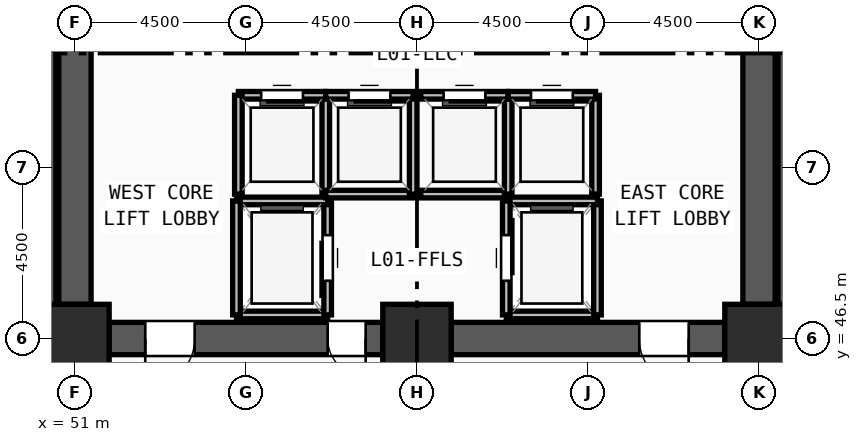
"""IFC4 building model, lengths in metres.
Left out: names, types, materials, properties, quantities, classifications, styles, units other than length and angle.
Written with IfcOpenShell. Run it as: python <this file> out.ifc"""

import sys

from ifc_helpers import new_model, si_unit, direction, frame, frame_2d, origin, origin_2d, place, context, subcontext, project, spatial, rectangle, extrude, source, transform, mapped, element, fill, save


model = new_model("IFC4")
c1 = context("Model", 3, precision=1e-05, world=origin(), true_north=direction((0.0, 1.0)))
c2 = subcontext(c1, "Body", "Model", "MODEL_VIEW")
j1 = project(units=[si_unit("LENGTHUNIT", "METRE"), si_unit("PLANEANGLEUNIT", "RADIAN")], contexts=[c1])
p1 = place(None, origin())
s1 = spatial("IfcSite", under=j1, at=p1, CompositionType="ELEMENT")
p2 = place(p1, origin())
s2 = spatial("IfcBuilding", under=s1, at=p2, CompositionType="ELEMENT")
p3 = place(p2, origin())
s3 = spatial("IfcBuildingStorey", under=s2, at=p3, CompositionType="ELEMENT", Elevation=0.0)
m1 = source(origin(), c2, "Body", "SweptSolid", [
    extrude(rectangle(XDim=1.8, YDim=1.8, at=origin_2d()), origin(), (0.0, 0.0, 1.0), 5.4),
])
for number, where, z_axis, x_axis in (
    (1, (51.0, 46.5, 0.0), (0.0, 0.0, 1.0), (1.0, 0.0, 0.0)),
    (2, (60.0, 46.5, 0.0), (0.0, 0.0, 1.0), (1.0, 0.0, 0.0)),
    (3, (69.0, 46.5, 0.0), (0.0, 0.0, 1.0), (1.0, 0.0, 0.0)),
):
    element("IfcColumn", number, at=place(p3, frame(where, z_axis=z_axis, x_axis=x_axis)), inside=s3, PredefinedType="COLUMN", context=c2, shape_type="MappedRepresentation", body=[
        mapped(m1, transform((0.0, 0.0, 0.0), x_axis=(1.0, 0.0, 0.0), y_axis=(0.0, 1.0, 0.0), z_axis=(0.0, 0.0, 1.0), scale=1.0)),
    ])
p4 = place(p3, frame((69.0, 60.6, 0.0), z_axis=(0.0, 0.0, 1.0), x_axis=(0.0, -1.0, 0.0)))
e4 = element("IfcWall", 4, at=p4, inside=s3, PredefinedType="SHEAR", context=c2, shape_type="SweptSolid", body=[
    extrude(rectangle(XDim=13.2, YDim=0.85, at=frame_2d((6.6, 0.0))), origin(), (0.0, 0.0, 1.0), 5.15),
])
m2 = source(origin(), c2, "Body", "SweptSolid", [
    extrude(rectangle(XDim=1.2, YDim=2.2, at=frame_2d((0.6, 1.1))), frame((0.0, 0.435, 0.0), z_axis=(0.0, -1.0, 0.0), x_axis=(1.0, 0.0, 0.0)), (0.0, 0.0, 1.0), 0.87),
])
p5 = place(p4, frame((1.05, 0.0, 0.0)))
e5 = element("IfcOpeningElement", 5, at=p5, cuts=e4, PredefinedType="OPENING", context=c2, shape_type="MappedRepresentation", body=[
    mapped(m2, transform((0.0, 0.0, 0.0), x_axis=(1.0, 0.0, 0.0), y_axis=(0.0, 1.0, 0.0), z_axis=(0.0, 0.0, 1.0), scale=1.0)),
])
p6 = place(p3, frame((68.1, 46.5, 0.0), z_axis=(0.0, 0.0, 1.0), x_axis=(-1.0, 0.0, 0.0)))
e6 = element("IfcWall", 6, at=p6, inside=s3, PredefinedType="SHEAR", context=c2, shape_type="SweptSolid", body=[
    extrude(rectangle(XDim=7.2, YDim=0.85, at=frame_2d((3.6, 0.0))), origin(), (0.0, 0.0, 1.0), 5.15),
])
m3 = source(origin(), c2, "Body", "SweptSolid", [
    extrude(rectangle(XDim=1.3, YDim=2.2, at=frame_2d((0.65, 1.1))), frame((0.0, 0.435, 0.0), z_axis=(0.0, -1.0, 0.0), x_axis=(1.0, 0.0, 0.0)), (0.0, 0.0, 1.0), 0.87),
])
p7 = place(p6, frame((0.95, 0.0, 0.0)))
e7 = element("IfcOpeningElement", 7, at=p7, cuts=e6, PredefinedType="OPENING", context=c2, shape_type="MappedRepresentation", body=[
    mapped(m3, transform((0.0, 0.0, 0.0), x_axis=(1.0, 0.0, 0.0), y_axis=(0.0, 1.0, 0.0), z_axis=(0.0, 0.0, 1.0), scale=1.0)),
])
p8 = place(p3, frame((59.1, 46.5, 0.0), z_axis=(0.0, 0.0, 1.0), x_axis=(-1.0, 0.0, 0.0)))
e8 = element("IfcWall", 8, at=p8, inside=s3, PredefinedType="SHEAR", context=c2, shape_type="SweptSolid", body=[
    extrude(rectangle(XDim=7.2, YDim=0.85, at=frame_2d((3.6, 0.0))), origin(), (0.0, 0.0, 1.0), 5.15),
])
p9 = place(p8, frame((4.95, 0.0, 0.0)))
e9 = element("IfcOpeningElement", 9, at=p9, cuts=e8, PredefinedType="OPENING", context=c2, shape_type="MappedRepresentation", body=[
    mapped(m3, transform((0.0, 0.0, 0.0), x_axis=(1.0, 0.0, 0.0), y_axis=(0.0, 1.0, 0.0), z_axis=(0.0, 0.0, 1.0), scale=1.0)),
])
m4 = source(origin(), c2, "Body", "SweptSolid", [
    extrude(rectangle(XDim=1.0, YDim=2.2, at=frame_2d((0.5, 1.1))), frame((0.0, 0.435, 0.0), z_axis=(0.0, -1.0, 0.0), x_axis=(1.0, 0.0, 0.0)), (0.0, 0.0, 1.0), 0.87),
])
p10 = place(p8, frame((0.45, 0.0, 0.0)))
e10 = element("IfcOpeningElement", 10, at=p10, cuts=e8, PredefinedType="OPENING", context=c2, shape_type="MappedRepresentation", body=[
    mapped(m4, transform((0.0, 0.0, 0.0), x_axis=(1.0, 0.0, 0.0), y_axis=(0.0, 1.0, 0.0), z_axis=(0.0, 0.0, 1.0), scale=1.0)),
])
p11 = place(p3, frame((51.0, 47.4, 0.0), z_axis=(0.0, 0.0, 1.0), x_axis=(0.0, 1.0, 0.0)))
e11 = element("IfcWall", 11, at=p11, inside=s3, PredefinedType="SHEAR", context=c2, shape_type="SweptSolid", body=[
    extrude(rectangle(XDim=13.2, YDim=0.85, at=frame_2d((6.6, 0.0))), origin(), (0.0, 0.0, 1.0), 5.15),
])
m5 = source(origin(), c2, "Body", "SweptSolid", [
    extrude(rectangle(XDim=1.1, YDim=2.2, at=frame_2d((0.55, 1.1))), frame((0.0, 0.435, 0.0), z_axis=(0.0, -1.0, 0.0), x_axis=(1.0, 0.0, 0.0)), (0.0, 0.0, 1.0), 0.87),
])
p12 = place(p11, frame((11.5, 0.0, 0.0)))
e12 = element("IfcOpeningElement", 12, at=p12, cuts=e11, PredefinedType="OPENING", context=c2, shape_type="MappedRepresentation", body=[
    mapped(m5, transform((0.0, 0.0, 0.0), x_axis=(1.0, 0.0, 0.0), y_axis=(0.0, 1.0, 0.0), z_axis=(0.0, 0.0, 1.0), scale=1.0)),
])
for number, where, z_axis, x_axis in (
    (13, (50.38, 46.7, 0.0), (0.0, 0.0, 1.0), (0.0, 1.0, 0.0)),
    (14, (69.62, 54.52, 0.0), (0.0, 0.0, 1.0), (0.0, -1.0, 0.0)),
):
    element("IfcWall", number, at=place(p3, frame(where, z_axis=z_axis, x_axis=x_axis)), inside=s3, PredefinedType="SOLIDWALL", context=c2, shape_type="SweptSolid", body=[
        extrude(rectangle(XDim=7.82, YDim=0.24, at=frame_2d((3.91, 0.0))), origin(), (0.0, 0.0, 1.0), 5.15),
    ])
p13 = place(p3, frame((55.25, 47.12, 0.0), z_axis=(0.0, 0.0, 1.0), x_axis=(1.0, 0.0, 0.0)))
e15 = element("IfcWall", 15, at=p13, inside=s3, PredefinedType="SOLIDWALL", context=c2, shape_type="SweptSolid", body=[
    extrude(rectangle(XDim=2.4, YDim=0.2, at=frame_2d((1.2, 0.0))), origin(), (0.0, 0.0, 1.0), 5.15),
])
p14 = place(p3, frame((57.65, 47.12, 0.0), z_axis=(0.0, 0.0, 1.0), x_axis=(0.0, 1.0, 0.0)))
e16 = element("IfcWall", 16, at=p14, inside=s3, PredefinedType="SOLIDWALL", context=c2, shape_type="SweptSolid", body=[
    extrude(rectangle(XDim=3.0, YDim=0.2, at=frame_2d((1.5, 0.0))), origin(), (0.0, 0.0, 1.0), 5.15),
])
m6 = source(origin(), c2, "Body", "SweptSolid", [
    extrude(rectangle(XDim=1.2, YDim=2.3, at=frame_2d((0.6, 1.15))), frame((0.0, 0.11, 0.0), z_axis=(0.0, -1.0, 0.0), x_axis=(1.0, 0.0, 0.0)), (0.0, 0.0, 1.0), 0.22),
])
p15 = place(p14, frame((0.9, 0.0, 0.0)))
e17 = element("IfcOpeningElement", 17, at=p15, cuts=e16, PredefinedType="OPENING", context=c2, shape_type="MappedRepresentation", body=[
    mapped(m6, transform((0.0, 0.0, 0.0), x_axis=(1.0, 0.0, 0.0), y_axis=(0.0, 1.0, 0.0), z_axis=(0.0, 0.0, 1.0), scale=1.0)),
])
p16 = place(p3, frame((57.65, 50.12, 0.0), z_axis=(0.0, 0.0, 1.0), x_axis=(-1.0, 0.0, 0.0)))
e18 = element("IfcWall", 18, at=p16, inside=s3, PredefinedType="SOLIDWALL", context=c2, shape_type="SweptSolid", body=[
    extrude(rectangle(XDim=2.4, YDim=0.2, at=frame_2d((1.2, 0.0))), origin(), (0.0, 0.0, 1.0), 5.15),
])
p17 = place(p3, frame((55.25, 50.12, 0.0), z_axis=(0.0, 0.0, 1.0), x_axis=(0.0, -1.0, 0.0)))
e19 = element("IfcWall", 19, at=p17, inside=s3, PredefinedType="SOLIDWALL", context=c2, shape_type="SweptSolid", body=[
    extrude(rectangle(XDim=3.0, YDim=0.2, at=frame_2d((1.5, 0.0))), origin(), (0.0, 0.0, 1.0), 5.15),
])
p18 = place(p3, frame((62.35, 47.12, 0.0), z_axis=(0.0, 0.0, 1.0), x_axis=(1.0, 0.0, 0.0)))
e20 = element("IfcWall", 20, at=p18, inside=s3, PredefinedType="SOLIDWALL", context=c2, shape_type="SweptSolid", body=[
    extrude(rectangle(XDim=2.4, YDim=0.2, at=frame_2d((1.2, 0.0))), origin(), (0.0, 0.0, 1.0), 5.15),
])
p19 = place(p3, frame((64.75, 47.12, 0.0), z_axis=(0.0, 0.0, 1.0), x_axis=(0.0, 1.0, 0.0)))
e21 = element("IfcWall", 21, at=p19, inside=s3, PredefinedType="SOLIDWALL", context=c2, shape_type="SweptSolid", body=[
    extrude(rectangle(XDim=3.0, YDim=0.2, at=frame_2d((1.5, 0.0))), origin(), (0.0, 0.0, 1.0), 5.15),
])
p20 = place(p3, frame((64.75, 50.12, 0.0), z_axis=(0.0, 0.0, 1.0), x_axis=(-1.0, 0.0, 0.0)))
e22 = element("IfcWall", 22, at=p20, inside=s3, PredefinedType="SOLIDWALL", context=c2, shape_type="SweptSolid", body=[
    extrude(rectangle(XDim=2.4, YDim=0.2, at=frame_2d((1.2, 0.0))), origin(), (0.0, 0.0, 1.0), 5.15),
])
p21 = place(p3, frame((62.35, 50.12, 0.0), z_axis=(0.0, 0.0, 1.0), x_axis=(0.0, -1.0, 0.0)))
e23 = element("IfcWall", 23, at=p21, inside=s3, PredefinedType="SOLIDWALL", context=c2, shape_type="SweptSolid", body=[
    extrude(rectangle(XDim=3.0, YDim=0.2, at=frame_2d((1.5, 0.0))), origin(), (0.0, 0.0, 1.0), 5.15),
])
p22 = place(p21, frame((0.9, 0.0, 0.0)))
e24 = element("IfcOpeningElement", 24, at=p22, cuts=e23, PredefinedType="OPENING", context=c2, shape_type="MappedRepresentation", body=[
    mapped(m6, transform((0.0, 0.0, 0.0), x_axis=(1.0, 0.0, 0.0), y_axis=(0.0, 1.0, 0.0), z_axis=(0.0, 0.0, 1.0), scale=1.0)),
])
p23 = place(p3, frame((57.6, 50.3, 0.0), z_axis=(0.0, 0.0, 1.0), x_axis=(0.0, 1.0, 0.0)))
e25 = element("IfcWall", 25, at=p23, inside=s3, PredefinedType="SOLIDWALL", context=c2, shape_type="SweptSolid", body=[
    extrude(rectangle(XDim=2.6, YDim=0.2, at=frame_2d((1.3, 0.0))), origin(), (0.0, 0.0, 1.0), 5.15),
])
p24 = place(p3, frame((57.6, 52.9, 0.0), z_axis=(0.0, 0.0, 1.0), x_axis=(-1.0, 0.0, 0.0)))
e26 = element("IfcWall", 26, at=p24, inside=s3, PredefinedType="SOLIDWALL", context=c2, shape_type="SweptSolid", body=[
    extrude(rectangle(XDim=2.3, YDim=0.2, at=frame_2d((1.15, 0.0))), origin(), (0.0, 0.0, 1.0), 5.15),
])
m7 = source(origin(), c2, "Body", "SweptSolid", [
    extrude(rectangle(XDim=1.1, YDim=2.2, at=frame_2d((0.55, 1.1))), frame((0.0, 0.11, 0.0), z_axis=(0.0, -1.0, 0.0), x_axis=(1.0, 0.0, 0.0)), (0.0, 0.0, 1.0), 0.22),
])
p25 = place(p24, frame((0.6, 0.0, 0.0)))
e27 = element("IfcOpeningElement", 27, at=p25, cuts=e26, PredefinedType="OPENING", context=c2, shape_type="MappedRepresentation", body=[
    mapped(m7, transform((0.0, 0.0, 0.0), x_axis=(1.0, 0.0, 0.0), y_axis=(0.0, 1.0, 0.0), z_axis=(0.0, 0.0, 1.0), scale=1.0)),
])
p26 = place(p3, frame((55.3, 52.9, 0.0), z_axis=(0.0, 0.0, 1.0), x_axis=(0.0, -1.0, 0.0)))
e28 = element("IfcWall", 28, at=p26, inside=s3, PredefinedType="SOLIDWALL", context=c2, shape_type="SweptSolid", body=[
    extrude(rectangle(XDim=2.6, YDim=0.2, at=frame_2d((1.3, 0.0))), origin(), (0.0, 0.0, 1.0), 5.15),
])
p27 = place(p3, frame((57.6, 50.3, 0.0), z_axis=(0.0, 0.0, 1.0), x_axis=(1.0, 0.0, 0.0)))
e29 = element("IfcWall", 29, at=p27, inside=s3, PredefinedType="SOLIDWALL", context=c2, shape_type="SweptSolid", body=[
    extrude(rectangle(XDim=2.3, YDim=0.2, at=frame_2d((1.15, 0.0))), origin(), (0.0, 0.0, 1.0), 5.15),
])
p28 = place(p3, frame((59.9, 50.3, 0.0), z_axis=(0.0, 0.0, 1.0), x_axis=(0.0, 1.0, 0.0)))
e30 = element("IfcWall", 30, at=p28, inside=s3, PredefinedType="SOLIDWALL", context=c2, shape_type="SweptSolid", body=[
    extrude(rectangle(XDim=2.6, YDim=0.2, at=frame_2d((1.3, 0.0))), origin(), (0.0, 0.0, 1.0), 5.15),
])
p29 = place(p3, frame((59.9, 52.9, 0.0), z_axis=(0.0, 0.0, 1.0), x_axis=(-1.0, 0.0, 0.0)))
e31 = element("IfcWall", 31, at=p29, inside=s3, PredefinedType="SOLIDWALL", context=c2, shape_type="SweptSolid", body=[
    extrude(rectangle(XDim=2.3, YDim=0.2, at=frame_2d((1.15, 0.0))), origin(), (0.0, 0.0, 1.0), 5.15),
])
p30 = place(p29, frame((0.6, 0.0, 0.0)))
e32 = element("IfcOpeningElement", 32, at=p30, cuts=e31, PredefinedType="OPENING", context=c2, shape_type="MappedRepresentation", body=[
    mapped(m7, transform((0.0, 0.0, 0.0), x_axis=(1.0, 0.0, 0.0), y_axis=(0.0, 1.0, 0.0), z_axis=(0.0, 0.0, 1.0), scale=1.0)),
])
p31 = place(p3, frame((60.1, 50.3, 0.0), z_axis=(0.0, 0.0, 1.0), x_axis=(1.0, 0.0, 0.0)))
e33 = element("IfcWall", 33, at=p31, inside=s3, PredefinedType="SOLIDWALL", context=c2, shape_type="SweptSolid", body=[
    extrude(rectangle(XDim=2.3, YDim=0.2, at=frame_2d((1.15, 0.0))), origin(), (0.0, 0.0, 1.0), 5.15),
])
p32 = place(p3, frame((62.4, 50.3, 0.0), z_axis=(0.0, 0.0, 1.0), x_axis=(0.0, 1.0, 0.0)))
e34 = element("IfcWall", 34, at=p32, inside=s3, PredefinedType="SOLIDWALL", context=c2, shape_type="SweptSolid", body=[
    extrude(rectangle(XDim=2.6, YDim=0.2, at=frame_2d((1.3, 0.0))), origin(), (0.0, 0.0, 1.0), 5.15),
])
p33 = place(p3, frame((62.4, 52.9, 0.0), z_axis=(0.0, 0.0, 1.0), x_axis=(-1.0, 0.0, 0.0)))
e35 = element("IfcWall", 35, at=p33, inside=s3, PredefinedType="SOLIDWALL", context=c2, shape_type="SweptSolid", body=[
    extrude(rectangle(XDim=2.3, YDim=0.2, at=frame_2d((1.15, 0.0))), origin(), (0.0, 0.0, 1.0), 5.15),
])
p34 = place(p33, frame((0.6, 0.0, 0.0)))
e36 = element("IfcOpeningElement", 36, at=p34, cuts=e35, PredefinedType="OPENING", context=c2, shape_type="MappedRepresentation", body=[
    mapped(m7, transform((0.0, 0.0, 0.0), x_axis=(1.0, 0.0, 0.0), y_axis=(0.0, 1.0, 0.0), z_axis=(0.0, 0.0, 1.0), scale=1.0)),
])
p35 = place(p3, frame((64.7, 50.3, 0.0), z_axis=(0.0, 0.0, 1.0), x_axis=(0.0, 1.0, 0.0)))
e37 = element("IfcWall", 37, at=p35, inside=s3, PredefinedType="SOLIDWALL", context=c2, shape_type="SweptSolid", body=[
    extrude(rectangle(XDim=2.6, YDim=0.2, at=frame_2d((1.3, 0.0))), origin(), (0.0, 0.0, 1.0), 5.15),
])
p36 = place(p3, frame((64.7, 52.9, 0.0), z_axis=(0.0, 0.0, 1.0), x_axis=(-1.0, 0.0, 0.0)))
e38 = element("IfcWall", 38, at=p36, inside=s3, PredefinedType="SOLIDWALL", context=c2, shape_type="SweptSolid", body=[
    extrude(rectangle(XDim=2.3, YDim=0.2, at=frame_2d((1.15, 0.0))), origin(), (0.0, 0.0, 1.0), 5.15),
])
p37 = place(p36, frame((0.6, 0.0, 0.0)))
e39 = element("IfcOpeningElement", 39, at=p37, cuts=e38, PredefinedType="OPENING", context=c2, shape_type="MappedRepresentation", body=[
    mapped(m7, transform((0.0, 0.0, 0.0), x_axis=(1.0, 0.0, 0.0), y_axis=(0.0, 1.0, 0.0), z_axis=(0.0, 0.0, 1.0), scale=1.0)),
])
m8 = source(origin(), c2, "Body", "SweptSolid", [
    extrude(rectangle(XDim=1.3, YDim=2.2, at=frame_2d((0.65, 1.1))), frame((0.0, 0.025, 0.0), z_axis=(0.0, -1.0, 0.0), x_axis=(1.0, 0.0, 0.0)), (0.0, 0.0, 1.0), 0.05),
])
p38 = place(p9, origin())
e40 = element("IfcDoor", 40, at=p38, inside=s3, OperationType="SINGLE_SWING_RIGHT", PredefinedType="DOOR", context=c2, shape_type="MappedRepresentation", body=[
    mapped(m8, transform((0.0, 0.0, 0.0), x_axis=(1.0, 0.0, 0.0), y_axis=(0.0, 1.0, 0.0), z_axis=(0.0, 0.0, 1.0), scale=1.0)),
])
fill(e9, e40)
m9 = source(origin(), c2, "Body", "SweptSolid", [
    extrude(rectangle(XDim=1.0, YDim=2.2, at=frame_2d((0.5, 1.1))), frame((0.0, 0.025, 0.0), z_axis=(0.0, -1.0, 0.0), x_axis=(1.0, 0.0, 0.0)), (0.0, 0.0, 1.0), 0.05),
])
p39 = place(p10, origin())
e41 = element("IfcDoor", 41, at=p39, inside=s3, OperationType="SINGLE_SWING_LEFT", PredefinedType="DOOR", context=c2, shape_type="MappedRepresentation", body=[
    mapped(m9, transform((0.0, 0.0, 0.0), x_axis=(1.0, 0.0, 0.0), y_axis=(0.0, 1.0, 0.0), z_axis=(0.0, 0.0, 1.0), scale=1.0)),
])
fill(e10, e41)
p40 = place(p7, origin())
e42 = element("IfcDoor", 42, at=p40, inside=s3, OperationType="SINGLE_SWING_LEFT", PredefinedType="DOOR", context=c2, shape_type="MappedRepresentation", body=[
    mapped(m8, transform((0.0, 0.0, 0.0), x_axis=(1.0, 0.0, 0.0), y_axis=(0.0, 1.0, 0.0), z_axis=(0.0, 0.0, 1.0), scale=1.0)),
])
fill(e7, e42)
m10 = source(origin(), c2, "Body", "SweptSolid", [
    extrude(rectangle(XDim=1.2, YDim=2.3, at=frame_2d((0.6, 1.15))), frame((0.0, 0.025, 0.0), z_axis=(0.0, -1.0, 0.0), x_axis=(1.0, 0.0, 0.0)), (0.0, 0.0, 1.0), 0.05),
])
p41 = place(p15, origin())
e43 = element("IfcDoor", 43, at=p41, inside=s3, OperationType="SLIDING_TO_LEFT", PredefinedType="DOOR", context=c2, shape_type="MappedRepresentation", body=[
    mapped(m10, transform((0.0, 0.0, 0.0), x_axis=(1.0, 0.0, 0.0), y_axis=(0.0, 1.0, 0.0), z_axis=(0.0, 0.0, 1.0), scale=1.0)),
])
fill(e17, e43)
p42 = place(p22, origin())
e44 = element("IfcDoor", 44, at=p42, inside=s3, OperationType="SLIDING_TO_LEFT", PredefinedType="DOOR", context=c2, shape_type="MappedRepresentation", body=[
    mapped(m10, transform((0.0, 0.0, 0.0), x_axis=(1.0, 0.0, 0.0), y_axis=(0.0, 1.0, 0.0), z_axis=(0.0, 0.0, 1.0), scale=1.0)),
])
fill(e24, e44)
m11 = source(origin(), c2, "Body", "SweptSolid", [
    extrude(rectangle(XDim=1.1, YDim=2.2, at=frame_2d((0.55, 1.1))), frame((0.0, 0.025, 0.0), z_axis=(0.0, -1.0, 0.0), x_axis=(1.0, 0.0, 0.0)), (0.0, 0.0, 1.0), 0.05),
])
p43 = place(p25, origin())
e45 = element("IfcDoor", 45, at=p43, inside=s3, OperationType="SLIDING_TO_LEFT", PredefinedType="DOOR", context=c2, shape_type="MappedRepresentation", body=[
    mapped(m11, transform((0.0, 0.0, 0.0), x_axis=(1.0, 0.0, 0.0), y_axis=(0.0, 1.0, 0.0), z_axis=(0.0, 0.0, 1.0), scale=1.0)),
])
fill(e27, e45)
p44 = place(p30, origin())
e46 = element("IfcDoor", 46, at=p44, inside=s3, OperationType="SLIDING_TO_LEFT", PredefinedType="DOOR", context=c2, shape_type="MappedRepresentation", body=[
    mapped(m11, transform((0.0, 0.0, 0.0), x_axis=(1.0, 0.0, 0.0), y_axis=(0.0, 1.0, 0.0), z_axis=(0.0, 0.0, 1.0), scale=1.0)),
])
fill(e32, e46)
p45 = place(p34, origin())
e47 = element("IfcDoor", 47, at=p45, inside=s3, OperationType="SLIDING_TO_LEFT", PredefinedType="DOOR", context=c2, shape_type="MappedRepresentation", body=[
    mapped(m11, transform((0.0, 0.0, 0.0), x_axis=(1.0, 0.0, 0.0), y_axis=(0.0, 1.0, 0.0), z_axis=(0.0, 0.0, 1.0), scale=1.0)),
])
fill(e36, e47)
p46 = place(p37, origin())
e48 = element("IfcDoor", 48, at=p46, inside=s3, OperationType="SLIDING_TO_LEFT", PredefinedType="DOOR", context=c2, shape_type="MappedRepresentation", body=[
    mapped(m11, transform((0.0, 0.0, 0.0), x_axis=(1.0, 0.0, 0.0), y_axis=(0.0, 1.0, 0.0), z_axis=(0.0, 0.0, 1.0), scale=1.0)),
])
fill(e39, e48)
save(model, sys.argv[1])
